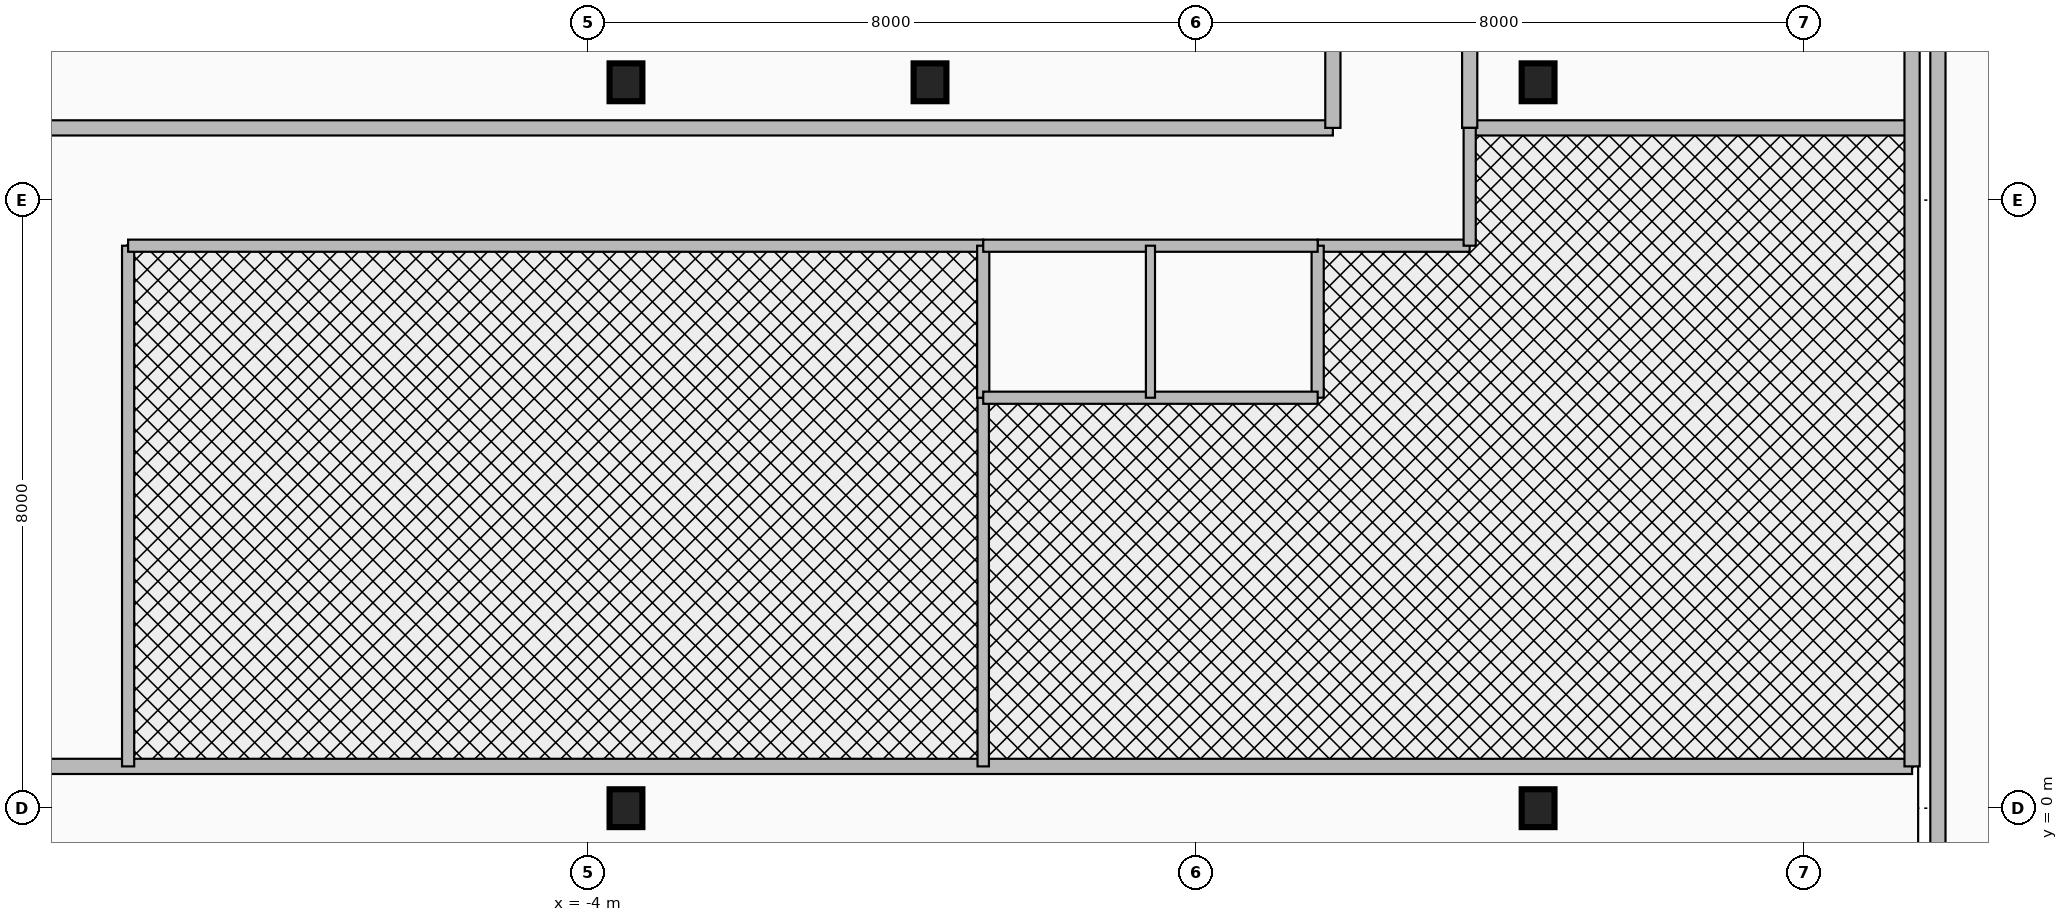
"""IFC4 building model, lengths in metres.
Left out: names, types, materials, properties, quantities, classifications, styles, units other than length and angle.
Written with IfcOpenShell. Run it as: python <this file> out.ifc"""

import sys

from ifc_helpers import new_model, si_unit, direction, frame, frame_2d, origin, origin_2d, place, context, subcontext, project, spatial, rectangle, i_section, extrude, source, transform, mapped, element, fill, save


model = new_model("IFC4")
c1 = context("Model", 3, precision=1e-05, world=origin(), true_north=direction((0.0, 1.0)))
c2 = subcontext(c1, "Body", "Model", "MODEL_VIEW")
j1 = project(units=[si_unit("LENGTHUNIT", "METRE"), si_unit("PLANEANGLEUNIT", "RADIAN")], contexts=[c1])
p1 = place(None, origin())
s1 = spatial("IfcSite", under=j1, at=p1, CompositionType="ELEMENT")
p2 = place(p1, origin())
s2 = spatial("IfcBuilding", under=s1, at=p2, CompositionType="ELEMENT")
p3 = place(p2, frame((0.0, 0.0, 172.3)))
s3 = spatial("IfcBuildingStorey", under=s2, at=p3, CompositionType="ELEMENT", Elevation=172.3)
m1 = source(origin(), c2, "Body", "SweptSolid", [
    extrude(i_section(OverallWidth=0.432, OverallDepth=0.498, WebThickness=0.056, FlangeThickness=0.089, at=origin_2d()), origin(), (0.0, 0.0, 1.0), 4.25),
])
for number, where, z_axis, x_axis in (
    (1, (-3.5, 0.0, 0.0), (0.0, 0.0, 1.0), (1.0, 0.0, 0.0)),
    (2, (-3.5, 9.55, 0.0), (0.0, 0.0, 1.0), (1.0, 0.0, 0.0)),
    (3, (8.5, 0.0, 0.0), (0.0, 0.0, 1.0), (1.0, 0.0, 0.0)),
    (4, (8.5, 9.55, 0.0), (0.0, 0.0, 1.0), (1.0, 0.0, 0.0)),
    (5, (0.5, 9.55, 0.0), (0.0, 0.0, 1.0), (1.0, 0.0, 0.0)),
):
    element("IfcColumn", number, at=place(p3, frame(where, z_axis=z_axis, x_axis=x_axis)), inside=s3, PredefinedType="COLUMN", context=c2, shape_type="MappedRepresentation", body=[
        mapped(m1, transform((0.0, 0.0, 0.0), x_axis=(1.0, 0.0, 0.0), y_axis=(0.0, 1.0, 0.0), z_axis=(0.0, 0.0, 1.0), scale=1.0)),
    ])
p4 = place(p3, frame((-11.55, 0.55, 0.0), z_axis=(0.0, 0.0, 1.0), x_axis=(1.0, 0.0, 0.0)))
e6 = element("IfcWall", 6, at=p4, inside=s3, PredefinedType="PARTITIONING", context=c2, shape_type="SweptSolid", body=[
    extrude(rectangle(XDim=24.97, YDim=0.2, at=frame_2d((12.485, 0.0))), origin(), (0.0, 0.0, 1.0), 2.715),
])
p5 = place(p3, frame((-11.55, 8.95, 0.0), z_axis=(0.0, 0.0, 1.0), x_axis=(1.0, 0.0, 0.0)))
e7 = element("IfcWall", 7, at=p5, inside=s3, PredefinedType="PARTITIONING", context=c2, shape_type="SweptSolid", body=[
    extrude(rectangle(XDim=17.35, YDim=0.2, at=frame_2d((8.675, 0.0))), origin(), (0.0, 0.0, 1.0), 2.715),
])
p6 = place(p3, frame((7.6, 8.95, 0.0), z_axis=(0.0, 0.0, 1.0), x_axis=(1.0, 0.0, 0.0)))
e8 = element("IfcWall", 8, at=p6, inside=s3, PredefinedType="PARTITIONING", context=c2, shape_type="SweptSolid", body=[
    extrude(rectangle(XDim=5.82, YDim=0.2, at=frame_2d((2.91, 0.0))), origin(), (0.0, 0.0, 1.0), 2.715),
])
for number, where, z_axis, x_axis in (
    (9, (5.8, 8.95, 0.0), (0.0, 0.0, 1.0), (0.0, 1.0, 0.0)),
    (10, (7.6, 8.95, 0.0), (0.0, 0.0, 1.0), (0.0, 1.0, 0.0)),
):
    element("IfcWall", number, at=place(p3, frame(where, z_axis=z_axis, x_axis=x_axis)), inside=s3, PredefinedType="PARTITIONING", context=c2, shape_type="SweptSolid", body=[
        extrude(rectangle(XDim=2.47, YDim=0.2, at=frame_2d((1.235, 0.0))), origin(), (0.0, 0.0, 1.0), 2.715),
    ])
p7 = place(p3, frame((13.42, 0.55, 0.0), z_axis=(0.0, 0.0, 1.0), x_axis=(0.0, 1.0, 0.0)))
e11 = element("IfcWall", 11, at=p7, inside=s3, PredefinedType="PARTITIONING", context=c2, shape_type="SweptSolid", body=[
    extrude(rectangle(XDim=10.87, YDim=0.2, at=frame_2d((5.435, 0.0))), origin(), (0.0, 0.0, 1.0), 2.715),
])
p8 = place(p3, frame((13.76, -2.0, 0.0), z_axis=(0.0, 0.0, 1.0), x_axis=(0.0, 1.0, 0.0)))
e12 = element("IfcWall", 12, at=p8, inside=s3, PredefinedType="PARTITIONING", context=c2, shape_type="SweptSolid", body=[
    extrude(rectangle(XDim=13.42, YDim=0.2, at=frame_2d((6.71, 0.0))), origin(), (0.0, 0.0, 1.0), 2.715),
])
p9 = place(p3, frame((-10.05, 0.55, 0.0), z_axis=(0.0, 0.0, 1.0), x_axis=(0.0, 1.0, 0.0)))
e13 = element("IfcWall", 13, at=p9, inside=s3, PredefinedType="PARTITIONING", context=c2, shape_type="SweptSolid", body=[
    extrude(rectangle(XDim=6.85, YDim=0.16, at=frame_2d((3.425, 0.0))), origin(), (0.0, 0.0, 1.0), 3.93),
])
p10 = place(p9, frame((2.2, 0.0, 0.0)))
e14 = element("IfcOpeningElement", 14, at=p10, cuts=e13, PredefinedType="OPENING", context=c2, shape_type="SweptSolid", body=[
    extrude(rectangle(XDim=1.8, YDim=2.15, at=frame_2d((0.9, 1.075))), frame((0.0, 0.095, 0.0), z_axis=(0.0, -1.0, 0.0), x_axis=(1.0, 0.0, 0.0)), (0.0, 0.0, 1.0), 0.19),
])
p11 = place(p3, frame((-10.05, 7.4, 0.0), z_axis=(0.0, 0.0, 1.0), x_axis=(1.0, 0.0, 0.0)))
e15 = element("IfcWall", 15, at=p11, inside=s3, PredefinedType="PARTITIONING", context=c2, shape_type="SweptSolid", body=[
    extrude(rectangle(XDim=11.25, YDim=0.16, at=frame_2d((5.625, 0.0))), origin(), (0.0, 0.0, 1.0), 2.915),
])
p12 = place(p11, frame((4.2, 0.0, 0.0)))
e16 = element("IfcOpeningElement", 16, at=p12, cuts=e15, PredefinedType="OPENING", context=c2, shape_type="SweptSolid", body=[
    extrude(rectangle(XDim=1.8, YDim=2.15, at=frame_2d((0.9, 1.075))), frame((0.0, 0.095, 0.0), z_axis=(0.0, -1.0, 0.0), x_axis=(1.0, 0.0, 0.0)), (0.0, 0.0, 1.0), 0.19),
])
p13 = place(p3, frame((5.6, 7.4, 0.0), z_axis=(0.0, 0.0, 1.0), x_axis=(1.0, 0.0, 0.0)))
e17 = element("IfcWall", 17, at=p13, inside=s3, PredefinedType="PARTITIONING", context=c2, shape_type="SweptSolid", body=[
    extrude(rectangle(XDim=2.0, YDim=0.16, at=frame_2d((1.0, 0.0))), origin(), (0.0, 0.0, 1.0), 3.93),
])
p14 = place(p13, frame((0.55, 0.0, 0.0)))
e18 = element("IfcOpeningElement", 18, at=p14, cuts=e17, PredefinedType="OPENING", context=c2, shape_type="SweptSolid", body=[
    extrude(rectangle(XDim=0.9, YDim=2.1, at=frame_2d((0.45, 1.05))), frame((0.0, 0.095, 0.0), z_axis=(0.0, -1.0, 0.0), x_axis=(1.0, 0.0, 0.0)), (0.0, 0.0, 1.0), 0.19),
])
p15 = place(p3, frame((7.6, 7.4, 0.0), z_axis=(0.0, 0.0, 1.0), x_axis=(0.0, 1.0, 0.0)))
e19 = element("IfcWall", 19, at=p15, inside=s3, PredefinedType="PARTITIONING", context=c2, shape_type="SweptSolid", body=[
    extrude(rectangle(XDim=1.55, YDim=0.16, at=frame_2d((0.775, 0.0))), origin(), (0.0, 0.0, 1.0), 2.715),
])
p16 = place(p3, frame((1.2, 0.55, 0.0), z_axis=(0.0, 0.0, 1.0), x_axis=(0.0, 1.0, 0.0)))
e20 = element("IfcWall", 20, at=p16, inside=s3, PredefinedType="PARTITIONING", context=c2, shape_type="SweptSolid", body=[
    extrude(rectangle(XDim=4.85, YDim=0.15, at=frame_2d((2.425, 0.0))), origin(), (0.0, 0.0, 1.0), 2.715),
])
p17 = place(p16, frame((1.8, 0.0, 0.0)))
e21 = element("IfcOpeningElement", 21, at=p17, cuts=e20, PredefinedType="OPENING", context=c2, shape_type="SweptSolid", body=[
    extrude(rectangle(XDim=0.9, YDim=2.1, at=frame_2d((0.45, 1.05))), frame((0.0, 0.09, 0.0), z_axis=(0.0, -1.0, 0.0), x_axis=(1.0, 0.0, 0.0)), (0.0, 0.0, 1.0), 0.18),
])
for number, where, z_axis, x_axis in (
    (22, (1.2, 5.4, 0.0), (0.0, 0.0, 1.0), (0.0, 1.0, 0.0)),
    (23, (5.6, 5.4, 0.0), (0.0, 0.0, 1.0), (0.0, 1.0, 0.0)),
):
    element("IfcWall", number, at=place(p3, frame(where, z_axis=z_axis, x_axis=x_axis)), inside=s3, PredefinedType="PARTITIONING", context=c2, shape_type="SweptSolid", body=[
        extrude(rectangle(XDim=2.0, YDim=0.16, at=frame_2d((1.0, 0.0))), origin(), (0.0, 0.0, 1.0), 3.93),
    ])
p18 = place(p3, frame((1.2, 5.4, 0.0), z_axis=(0.0, 0.0, 1.0), x_axis=(1.0, 0.0, 0.0)))
e24 = element("IfcWall", 24, at=p18, inside=s3, PredefinedType="PARTITIONING", context=c2, shape_type="SweptSolid", body=[
    extrude(rectangle(XDim=4.4, YDim=0.16, at=frame_2d((2.2, 0.0))), origin(), (0.0, 0.0, 1.0), 3.93),
])
p19 = place(p3, frame((1.2, 7.4, 0.0), z_axis=(0.0, 0.0, 1.0), x_axis=(1.0, 0.0, 0.0)))
e25 = element("IfcWall", 25, at=p19, inside=s3, PredefinedType="PARTITIONING", context=c2, shape_type="SweptSolid", body=[
    extrude(rectangle(XDim=4.4, YDim=0.16, at=frame_2d((2.2, 0.0))), origin(), (0.0, 0.0, 1.0), 3.93),
])
p20 = place(p19, frame((0.3, 0.0, 0.0)))
e26 = element("IfcOpeningElement", 26, at=p20, cuts=e25, PredefinedType="OPENING", context=c2, shape_type="SweptSolid", body=[
    extrude(rectangle(XDim=0.85, YDim=2.1, at=frame_2d((0.425, 1.05))), frame((0.0, 0.095, 0.0), z_axis=(0.0, -1.0, 0.0), x_axis=(1.0, 0.0, 0.0)), (0.0, 0.0, 1.0), 0.19),
])
p21 = place(p19, frame((2.45, 0.0, 0.0)))
e27 = element("IfcOpeningElement", 27, at=p21, cuts=e25, PredefinedType="OPENING", context=c2, shape_type="SweptSolid", body=[
    extrude(rectangle(XDim=0.85, YDim=2.1, at=frame_2d((0.425, 1.05))), frame((0.0, 0.095, 0.0), z_axis=(0.0, -1.0, 0.0), x_axis=(1.0, 0.0, 0.0)), (0.0, 0.0, 1.0), 0.19),
])
p22 = place(p3, frame((3.4, 5.4, 0.0), z_axis=(0.0, 0.0, 1.0), x_axis=(0.0, 1.0, 0.0)))
e28 = element("IfcWall", 28, at=p22, inside=s3, PredefinedType="PARTITIONING", context=c2, shape_type="SweptSolid", body=[
    extrude(rectangle(XDim=2.0, YDim=0.12, at=frame_2d((1.0, 0.0))), origin(), (0.0, 0.0, 1.0), 3.93),
])
p23 = place(p10, origin())
e29 = element("IfcDoor", 29, at=p23, inside=s3, OperationType="DOUBLE_DOOR_SINGLE_SWING", PredefinedType="DOOR", context=c2, shape_type="SweptSolid", body=[
    extrude(rectangle(XDim=1.8, YDim=2.15, at=frame_2d((0.9, 1.075))), frame((0.0, 0.025, 0.0), z_axis=(0.0, -1.0, 0.0), x_axis=(1.0, 0.0, 0.0)), (0.0, 0.0, 1.0), 0.05),
])
fill(e14, e29)
p24 = place(p12, frame((1.8, 0.0, 0.0), z_axis=(0.0, 0.0, 1.0), x_axis=(-1.0, 0.0, 0.0)))
e30 = element("IfcDoor", 30, at=p24, inside=s3, OperationType="DOUBLE_DOOR_SINGLE_SWING", PredefinedType="DOOR", context=c2, shape_type="SweptSolid", body=[
    extrude(rectangle(XDim=1.8, YDim=2.15, at=frame_2d((0.9, 1.075))), frame((0.0, 0.025, 0.0), z_axis=(0.0, -1.0, 0.0), x_axis=(1.0, 0.0, 0.0)), (0.0, 0.0, 1.0), 0.05),
])
fill(e16, e30)
p25 = place(p14, origin())
e31 = element("IfcDoor", 31, at=p25, inside=s3, OperationType="SINGLE_SWING_RIGHT", PredefinedType="DOOR", context=c2, shape_type="SweptSolid", body=[
    extrude(rectangle(XDim=0.9, YDim=2.1, at=frame_2d((0.45, 1.05))), frame((0.0, 0.025, 0.0), z_axis=(0.0, -1.0, 0.0), x_axis=(1.0, 0.0, 0.0)), (0.0, 0.0, 1.0), 0.05),
])
fill(e18, e31)
p26 = place(p17, frame((0.9, 0.0, 0.0), z_axis=(0.0, 0.0, 1.0), x_axis=(-1.0, 0.0, 0.0)))
e32 = element("IfcDoor", 32, at=p26, inside=s3, OperationType="SINGLE_SWING_LEFT", PredefinedType="DOOR", context=c2, shape_type="SweptSolid", body=[
    extrude(rectangle(XDim=0.9, YDim=2.1, at=frame_2d((0.45, 1.05))), frame((0.0, 0.025, 0.0), z_axis=(0.0, -1.0, 0.0), x_axis=(1.0, 0.0, 0.0)), (0.0, 0.0, 1.0), 0.05),
])
fill(e21, e32)
p27 = place(p20, origin())
e33 = element("IfcDoor", 33, at=p27, inside=s3, OperationType="SINGLE_SWING_RIGHT", PredefinedType="DOOR", context=c2, shape_type="SweptSolid", body=[
    extrude(rectangle(XDim=0.85, YDim=2.1, at=frame_2d((0.425, 1.05))), frame((0.0, 0.025, 0.0), z_axis=(0.0, -1.0, 0.0), x_axis=(1.0, 0.0, 0.0)), (0.0, 0.0, 1.0), 0.05),
])
fill(e26, e33)
p28 = place(p21, origin())
e34 = element("IfcDoor", 34, at=p28, inside=s3, OperationType="SINGLE_SWING_LEFT", PredefinedType="DOOR", context=c2, shape_type="SweptSolid", body=[
    extrude(rectangle(XDim=0.85, YDim=2.1, at=frame_2d((0.425, 1.05))), frame((0.0, 0.025, 0.0), z_axis=(0.0, -1.0, 0.0), x_axis=(1.0, 0.0, 0.0)), (0.0, 0.0, 1.0), 0.05),
])
fill(e27, e34)
save(model, sys.argv[1])
